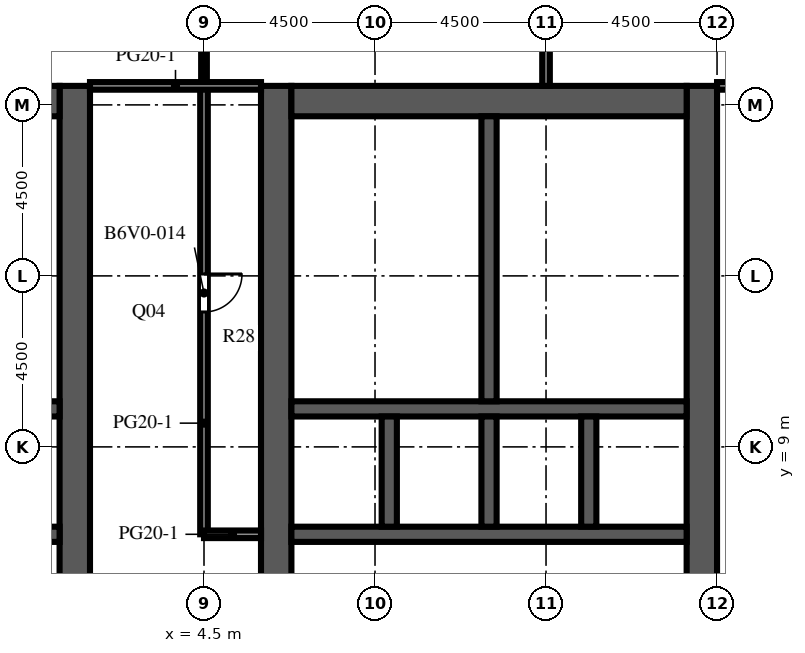
"""IFC4 building model, lengths in metres.
Left out: names, types, materials, properties, quantities, classifications, styles, units other than length and angle.
Written with IfcOpenShell. Run it as: python <this file> out.ifc"""

import sys

from ifc_helpers import new_model, si_unit, direction, frame, frame_2d, origin, place, context, subcontext, project, spatial, rectangle, extrude, element, fill, save


model = new_model("IFC4")
c1 = context("Model", 3, precision=1e-05, world=origin(), true_north=direction((0.0, 1.0)))
c2 = subcontext(c1, "Body", "Model", "MODEL_VIEW")
j1 = project(units=[si_unit("LENGTHUNIT", "METRE"), si_unit("PLANEANGLEUNIT", "RADIAN")], contexts=[c1])
p1 = place(None, origin())
s1 = spatial("IfcSite", under=j1, at=p1, CompositionType="ELEMENT")
p2 = place(p1, origin())
s2 = spatial("IfcBuilding", under=s1, at=p2, CompositionType="ELEMENT")
p3 = place(p2, frame((0.0, 0.0, 195.6)))
s3 = spatial("IfcBuildingStorey", under=s2, at=p3, CompositionType="ELEMENT", Elevation=195.6)
p4 = place(p3, frame((1.1, -9.0, 0.0), z_axis=(0.0, 0.0, 1.0), x_axis=(0.0, 1.0, 0.0)))
e1 = element("IfcWall", 1, at=p4, inside=s3, PredefinedType="SHEAR", context=c2, shape_type="SweptSolid", body=[
    extrude(rectangle(XDim=27.5, YDim=0.8, at=frame_2d((13.75, 0.0))), origin(), (0.0, 0.0, 1.0), 4.1),
])
p5 = place(p4, frame((12.55, 0.0, 0.0)))
e2 = element("IfcOpeningElement", 2, at=p5, cuts=e1, PredefinedType="OPENING", context=c2, shape_type="SweptSolid", body=[
    extrude(rectangle(XDim=2.4, YDim=2.4, at=frame_2d((1.2, 1.2))), frame((0.0, 0.41, 0.0), z_axis=(0.0, -1.0, 0.0), x_axis=(1.0, 0.0, 0.0)), (0.0, 0.0, 1.0), 0.82),
])
p6 = place(p4, frame((3.95, 0.0, 0.0)))
e3 = element("IfcOpeningElement", 3, at=p6, cuts=e1, PredefinedType="OPENING", context=c2, shape_type="SweptSolid", body=[
    extrude(rectangle(XDim=1.2, YDim=2.1, at=frame_2d((0.6, 1.05))), frame((0.0, 0.41, 0.0), z_axis=(0.0, -1.0, 0.0), x_axis=(1.0, 0.0, 0.0)), (0.0, 0.0, 1.0), 0.82),
])
p7 = place(p4, frame((19.45, 0.0, 0.0)))
e4 = element("IfcOpeningElement", 4, at=p7, cuts=e1, PredefinedType="OPENING", context=c2, shape_type="SweptSolid", body=[
    extrude(rectangle(XDim=1.0, YDim=2.1, at=frame_2d((0.5, 1.05))), frame((0.0, 0.41, 0.0), z_axis=(0.0, -1.0, 0.0), x_axis=(1.0, 0.0, 0.0)), (0.0, 0.0, 1.0), 0.82),
])
p8 = place(p4, frame((21.137, 0.0, 0.0)))
e5 = element("IfcOpeningElement", 5, at=p8, cuts=e1, PredefinedType="OPENING", context=c2, shape_type="SweptSolid", body=[
    extrude(rectangle(XDim=1.0, YDim=2.1, at=frame_2d((0.5, 1.05))), frame((0.0, 0.41, 0.0), z_axis=(0.0, -1.0, 0.0), x_axis=(1.0, 0.0, 0.0)), (0.0, 0.0, 1.0), 0.82),
])
p9 = place(p4, frame((23.2, 0.0, 0.0)))
e6 = element("IfcOpeningElement", 6, at=p9, cuts=e1, PredefinedType="OPENING", context=c2, shape_type="SweptSolid", body=[
    extrude(rectangle(XDim=1.0, YDim=2.1, at=frame_2d((0.5, 1.05))), frame((0.0, 0.41, 0.0), z_axis=(0.0, -1.0, 0.0), x_axis=(1.0, 0.0, 0.0)), (0.0, 0.0, 1.0), 0.82),
])
p10 = place(p4, frame((25.262, 0.0, 0.0)))
e7 = element("IfcOpeningElement", 7, at=p10, cuts=e1, PredefinedType="OPENING", context=c2, shape_type="SweptSolid", body=[
    extrude(rectangle(XDim=1.0, YDim=2.1, at=frame_2d((0.5, 1.05))), frame((0.0, 0.41, 0.0), z_axis=(0.0, -1.0, 0.0), x_axis=(1.0, 0.0, 0.0)), (0.0, 0.0, 1.0), 0.82),
])
p11 = place(p3, frame((-9.7, 18.1, 0.0), z_axis=(0.0, 0.0, 1.0), x_axis=(1.0, 0.0, 0.0)))
e8 = element("IfcWall", 8, at=p11, inside=s3, PredefinedType="SHEAR", context=c2, shape_type="SweptSolid", body=[
    extrude(rectangle(XDim=10.4, YDim=0.8, at=frame_2d((5.2, 0.0))), origin(), (0.0, 0.0, 1.0), 4.1),
])
p12 = place(p3, frame((-9.7, 6.7, 0.0), z_axis=(0.0, 0.0, 1.0), x_axis=(1.0, 0.0, 0.0)))
e9 = element("IfcWall", 9, at=p12, inside=s3, PredefinedType="SHEAR", context=c2, shape_type="SweptSolid", body=[
    extrude(rectangle(XDim=10.4, YDim=0.4, at=frame_2d((5.2, 0.0))), origin(), (0.0, 0.0, 1.0), 4.1),
])
p13 = place(p12, frame((3.337, 0.0, 0.0)))
e10 = element("IfcOpeningElement", 10, at=p13, cuts=e9, PredefinedType="OPENING", context=c2, shape_type="SweptSolid", body=[
    extrude(rectangle(XDim=1.1, YDim=2.1, at=frame_2d((0.55, 1.05))), frame((0.0, 0.21, 0.0), z_axis=(0.0, -1.0, 0.0), x_axis=(1.0, 0.0, 0.0)), (0.0, 0.0, 1.0), 0.42),
])
p14 = place(p12, frame((5.962, 0.0, 0.0)))
e11 = element("IfcOpeningElement", 11, at=p14, cuts=e9, PredefinedType="OPENING", context=c2, shape_type="SweptSolid", body=[
    extrude(rectangle(XDim=1.1, YDim=2.1, at=frame_2d((0.55, 1.05))), frame((0.0, 0.21, 0.0), z_axis=(0.0, -1.0, 0.0), x_axis=(1.0, 0.0, 0.0)), (0.0, 0.0, 1.0), 0.42),
])
p15 = place(p12, frame((8.663, 0.0, 0.0)))
e12 = element("IfcOpeningElement", 12, at=p15, cuts=e9, PredefinedType="OPENING", context=c2, shape_type="SweptSolid", body=[
    extrude(rectangle(XDim=1.1, YDim=2.1, at=frame_2d((0.55, 1.05))), frame((0.0, 0.21, 0.0), z_axis=(0.0, -1.0, 0.0), x_axis=(1.0, 0.0, 0.0)), (0.0, 0.0, 1.0), 0.42),
])
p16 = place(p12, frame((0.688, 0.0, 0.0)))
e13 = element("IfcOpeningElement", 13, at=p16, cuts=e9, PredefinedType="OPENING", context=c2, shape_type="SweptSolid", body=[
    extrude(rectangle(XDim=1.0, YDim=2.1, at=frame_2d((0.5, 1.05))), frame((0.0, 0.21, 0.0), z_axis=(0.0, -1.0, 0.0), x_axis=(1.0, 0.0, 0.0)), (0.0, 0.0, 1.0), 0.42),
])
p17 = place(p3, frame((-9.7, 10.0, 0.0), z_axis=(0.0, 0.0, 1.0), x_axis=(1.0, 0.0, 0.0)))
e14 = element("IfcWall", 14, at=p17, inside=s3, PredefinedType="SHEAR", context=c2, shape_type="SweptSolid", body=[
    extrude(rectangle(XDim=10.4, YDim=0.4, at=frame_2d((5.2, 0.0))), origin(), (0.0, 0.0, 1.0), 4.1),
])
p18 = place(p3, frame((6.4, -9.0, 0.0), z_axis=(0.0, 0.0, 1.0), x_axis=(0.0, 1.0, 0.0)))
e15 = element("IfcWall", 15, at=p18, inside=s3, PredefinedType="SHEAR", context=c2, shape_type="SweptSolid", body=[
    extrude(rectangle(XDim=27.5, YDim=0.8, at=frame_2d((13.75, 0.0))), origin(), (0.0, 0.0, 1.0), 4.1),
])
p19 = place(p18, frame((12.55, 0.0, 0.0)))
e16 = element("IfcOpeningElement", 16, at=p19, cuts=e15, PredefinedType="OPENING", context=c2, shape_type="SweptSolid", body=[
    extrude(rectangle(XDim=2.4, YDim=2.4, at=frame_2d((1.2, 1.2))), frame((0.0, 0.41, 0.0), z_axis=(0.0, -1.0, 0.0), x_axis=(1.0, 0.0, 0.0)), (0.0, 0.0, 1.0), 0.82),
])
p20 = place(p18, frame((3.95, 0.0, 0.0)))
e17 = element("IfcOpeningElement", 17, at=p20, cuts=e15, PredefinedType="OPENING", context=c2, shape_type="SweptSolid", body=[
    extrude(rectangle(XDim=1.2, YDim=2.1, at=frame_2d((0.6, 1.05))), frame((0.0, 0.41, 0.0), z_axis=(0.0, -1.0, 0.0), x_axis=(1.0, 0.0, 0.0)), (0.0, 0.0, 1.0), 0.82),
])
p21 = place(p18, frame((19.45, 0.0, 0.0)))
e18 = element("IfcOpeningElement", 18, at=p21, cuts=e15, PredefinedType="OPENING", context=c2, shape_type="SweptSolid", body=[
    extrude(rectangle(XDim=1.0, YDim=2.1, at=frame_2d((0.5, 1.05))), frame((0.0, 0.41, 0.0), z_axis=(0.0, -1.0, 0.0), x_axis=(1.0, 0.0, 0.0)), (0.0, 0.0, 1.0), 0.82),
])
p22 = place(p18, frame((21.137, 0.0, 0.0)))
e19 = element("IfcOpeningElement", 19, at=p22, cuts=e15, PredefinedType="OPENING", context=c2, shape_type="SweptSolid", body=[
    extrude(rectangle(XDim=1.0, YDim=2.1, at=frame_2d((0.5, 1.05))), frame((0.0, 0.41, 0.0), z_axis=(0.0, -1.0, 0.0), x_axis=(1.0, 0.0, 0.0)), (0.0, 0.0, 1.0), 0.82),
])
p23 = place(p18, frame((23.2, 0.0, 0.0)))
e20 = element("IfcOpeningElement", 20, at=p23, cuts=e15, PredefinedType="OPENING", context=c2, shape_type="SweptSolid", body=[
    extrude(rectangle(XDim=1.0, YDim=2.1, at=frame_2d((0.5, 1.05))), frame((0.0, 0.41, 0.0), z_axis=(0.0, -1.0, 0.0), x_axis=(1.0, 0.0, 0.0)), (0.0, 0.0, 1.0), 0.82),
])
p24 = place(p18, frame((25.262, 0.0, 0.0)))
e21 = element("IfcOpeningElement", 21, at=p24, cuts=e15, PredefinedType="OPENING", context=c2, shape_type="SweptSolid", body=[
    extrude(rectangle(XDim=1.0, YDim=2.1, at=frame_2d((0.5, 1.05))), frame((0.0, 0.41, 0.0), z_axis=(0.0, -1.0, 0.0), x_axis=(1.0, 0.0, 0.0)), (0.0, 0.0, 1.0), 0.82),
])
p25 = place(p3, frame((17.6, -9.0, 0.0), z_axis=(0.0, 0.0, 1.0), x_axis=(0.0, 1.0, 0.0)))
e22 = element("IfcWall", 22, at=p25, inside=s3, PredefinedType="SHEAR", context=c2, shape_type="SweptSolid", body=[
    extrude(rectangle(XDim=27.5, YDim=0.8, at=frame_2d((13.75, 0.0))), origin(), (0.0, 0.0, 1.0), 4.1),
])
p26 = place(p25, frame((12.55, 0.0, 0.0)))
e23 = element("IfcOpeningElement", 23, at=p26, cuts=e22, PredefinedType="OPENING", context=c2, shape_type="SweptSolid", body=[
    extrude(rectangle(XDim=2.4, YDim=2.4, at=frame_2d((1.2, 1.2))), frame((0.0, 0.41, 0.0), z_axis=(0.0, -1.0, 0.0), x_axis=(1.0, 0.0, 0.0)), (0.0, 0.0, 1.0), 0.82),
])
p27 = place(p25, frame((6.825, 0.0, 0.0)))
e24 = element("IfcOpeningElement", 24, at=p27, cuts=e22, PredefinedType="OPENING", context=c2, shape_type="SweptSolid", body=[
    extrude(rectangle(XDim=1.2, YDim=2.1, at=frame_2d((0.6, 1.05))), frame((0.0, 0.41, 0.0), z_axis=(0.0, -1.0, 0.0), x_axis=(1.0, 0.0, 0.0)), (0.0, 0.0, 1.0), 0.82),
])
p28 = place(p25, frame((19.475, 0.0, 0.0)))
e25 = element("IfcOpeningElement", 25, at=p28, cuts=e22, PredefinedType="OPENING", context=c2, shape_type="SweptSolid", body=[
    extrude(rectangle(XDim=1.2, YDim=2.1, at=frame_2d((0.6, 1.05))), frame((0.0, 0.41, 0.0), z_axis=(0.0, -1.0, 0.0), x_axis=(1.0, 0.0, 0.0)), (0.0, 0.0, 1.0), 0.82),
])
p29 = place(p3, frame((6.8, 18.1, 0.0), z_axis=(0.0, 0.0, 1.0), x_axis=(1.0, 0.0, 0.0)))
e26 = element("IfcWall", 26, at=p29, inside=s3, PredefinedType="SHEAR", context=c2, shape_type="SweptSolid", body=[
    extrude(rectangle(XDim=10.4, YDim=0.8, at=frame_2d((5.2, 0.0))), origin(), (0.0, 0.0, 1.0), 4.1),
])
p30 = place(p3, frame((6.8, 6.7, 0.0), z_axis=(0.0, 0.0, 1.0), x_axis=(1.0, 0.0, 0.0)))
e27 = element("IfcWall", 27, at=p30, inside=s3, PredefinedType="SHEAR", context=c2, shape_type="SweptSolid", body=[
    extrude(rectangle(XDim=10.4, YDim=0.4, at=frame_2d((5.2, 0.0))), origin(), (0.0, 0.0, 1.0), 4.1),
])
p31 = place(p30, frame((3.337, 0.0, 0.0)))
e28 = element("IfcOpeningElement", 28, at=p31, cuts=e27, PredefinedType="OPENING", context=c2, shape_type="SweptSolid", body=[
    extrude(rectangle(XDim=1.1, YDim=2.1, at=frame_2d((0.55, 1.05))), frame((0.0, 0.21, 0.0), z_axis=(0.0, -1.0, 0.0), x_axis=(1.0, 0.0, 0.0)), (0.0, 0.0, 1.0), 0.42),
])
p32 = place(p30, frame((5.962, 0.0, 0.0)))
e29 = element("IfcOpeningElement", 29, at=p32, cuts=e27, PredefinedType="OPENING", context=c2, shape_type="SweptSolid", body=[
    extrude(rectangle(XDim=1.1, YDim=2.1, at=frame_2d((0.55, 1.05))), frame((0.0, 0.21, 0.0), z_axis=(0.0, -1.0, 0.0), x_axis=(1.0, 0.0, 0.0)), (0.0, 0.0, 1.0), 0.42),
])
p33 = place(p30, frame((8.663, 0.0, 0.0)))
e30 = element("IfcOpeningElement", 30, at=p33, cuts=e27, PredefinedType="OPENING", context=c2, shape_type="SweptSolid", body=[
    extrude(rectangle(XDim=1.1, YDim=2.1, at=frame_2d((0.55, 1.05))), frame((0.0, 0.21, 0.0), z_axis=(0.0, -1.0, 0.0), x_axis=(1.0, 0.0, 0.0)), (0.0, 0.0, 1.0), 0.42),
])
p34 = place(p30, frame((0.688, 0.0, 0.0)))
e31 = element("IfcOpeningElement", 31, at=p34, cuts=e27, PredefinedType="OPENING", context=c2, shape_type="SweptSolid", body=[
    extrude(rectangle(XDim=1.0, YDim=2.1, at=frame_2d((0.5, 1.05))), frame((0.0, 0.21, 0.0), z_axis=(0.0, -1.0, 0.0), x_axis=(1.0, 0.0, 0.0)), (0.0, 0.0, 1.0), 0.42),
])
p35 = place(p3, frame((6.8, 10.0, 0.0), z_axis=(0.0, 0.0, 1.0), x_axis=(1.0, 0.0, 0.0)))
e32 = element("IfcWall", 32, at=p35, inside=s3, PredefinedType="SHEAR", context=c2, shape_type="SweptSolid", body=[
    extrude(rectangle(XDim=10.4, YDim=0.4, at=frame_2d((5.2, 0.0))), origin(), (0.0, 0.0, 1.0), 4.1),
])
for number, where, z_axis, x_axis in (
    (33, (9.375, 6.9, 0.0), (0.0, 0.0, 1.0), (0.0, 1.0, 0.0)),
    (34, (12.0, 6.9, 0.0), (0.0, 0.0, 1.0), (0.0, 1.0, 0.0)),
    (35, (14.625, 6.9, 0.0), (0.0, 0.0, 1.0), (0.0, 1.0, 0.0)),
):
    element("IfcWall", number, at=place(p3, frame(where, z_axis=z_axis, x_axis=x_axis)), inside=s3, PredefinedType="SHEAR", context=c2, shape_type="SweptSolid", body=[
        extrude(rectangle(XDim=2.9, YDim=0.4, at=frame_2d((1.45, 0.0))), origin(), (0.0, 0.0, 1.0), 4.1),
    ])
p36 = place(p3, frame((12.0, 10.2, 0.0), z_axis=(0.0, 0.0, 1.0), x_axis=(0.0, 1.0, 0.0)))
e36 = element("IfcWall", 36, at=p36, inside=s3, PredefinedType="SHEAR", context=c2, shape_type="SweptSolid", body=[
    extrude(rectangle(XDim=7.5, YDim=0.4, at=frame_2d((3.75, 0.0))), origin(), (0.0, 0.0, 1.0), 4.1),
])
for number, where, z_axis, x_axis in (
    (37, (-4.3, 11.7, 0.0), (0.0, 0.0, 1.0), (1.0, 0.0, 0.0)),
    (38, (-4.3, 13.575, 0.0), (0.0, 0.0, 1.0), (1.0, 0.0, 0.0)),
    (39, (-4.3, 15.825, 0.0), (0.0, 0.0, 1.0), (1.0, 0.0, 0.0)),
    (40, (6.8, 11.7, 0.0), (0.0, 0.0, 1.0), (1.0, 0.0, 0.0)),
    (41, (6.8, 13.575, 0.0), (0.0, 0.0, 1.0), (1.0, 0.0, 0.0)),
    (42, (6.8, 15.825, 0.0), (0.0, 0.0, 1.0), (1.0, 0.0, 0.0)),
):
    element("IfcWall", number, at=place(p3, frame(where, z_axis=z_axis, x_axis=x_axis)), inside=s3, PredefinedType="PARTITIONING", context=c2, shape_type="SweptSolid", body=[
        extrude(rectangle(XDim=5.0, YDim=0.1, at=frame_2d((2.5, 0.0))), origin(), (0.0, 0.0, 1.0), 3.65),
    ])
p37 = place(p3, frame((4.5, 26.5, 0.0), z_axis=(0.0, 0.0, 1.0), x_axis=(0.0, -1.0, 0.0)))
e43 = element("IfcWall", 43, at=p37, inside=s3, PredefinedType="PARTITIONING", context=c2, shape_type="SweptSolid", body=[
    extrude(rectangle(XDim=8.0, YDim=0.15, at=frame_2d((4.0, 0.0))), origin(), (0.0, 0.0, 1.0), 3.65),
])
p38 = place(p37, frame((3.15, 0.0, 0.0)))
e44 = element("IfcOpeningElement", 44, at=p38, cuts=e43, PredefinedType="OPENING", context=c2, shape_type="SweptSolid", body=[
    extrude(rectangle(XDim=1.0, YDim=2.1, at=frame_2d((0.5, 1.05))), frame((0.0, 0.085, 0.0), z_axis=(0.0, -1.0, 0.0), x_axis=(1.0, 0.0, 0.0)), (0.0, 0.0, 1.0), 0.17),
])
p39 = place(p3, frame((4.5, 18.5, 0.0), z_axis=(0.0, 0.0, 1.0), x_axis=(0.0, -1.0, 0.0)))
e45 = element("IfcWall", 45, at=p39, inside=s3, PredefinedType="PARTITIONING", context=c2, shape_type="SweptSolid", body=[
    extrude(rectangle(XDim=11.8, YDim=0.2, at=frame_2d((5.9, 0.0))), origin(), (0.0, 0.0, 1.0), 3.65),
])
p40 = place(p39, frame((4.95, 0.0, 0.0)))
e46 = element("IfcOpeningElement", 46, at=p40, cuts=e45, PredefinedType="OPENING", context=c2, shape_type="SweptSolid", body=[
    extrude(rectangle(XDim=1.0, YDim=2.1, at=frame_2d((0.5, 1.05))), frame((0.0, 0.11, 0.0), z_axis=(0.0, -1.0, 0.0), x_axis=(1.0, 0.0, 0.0)), (0.0, 0.0, 1.0), 0.22),
])
p41 = place(p3, frame((13.5, 18.5, 0.0), z_axis=(0.0, 0.0, 1.0), x_axis=(0.0, 1.0, 0.0)))
e47 = element("IfcWall", 47, at=p41, inside=s3, PredefinedType="PARTITIONING", context=c2, shape_type="SweptSolid", body=[
    extrude(rectangle(XDim=8.0, YDim=0.2, at=frame_2d((4.0, 0.0))), origin(), (0.0, 0.0, 1.0), 3.65),
])
p42 = place(p3, frame((4.5, 6.7, 0.0), z_axis=(0.0, 0.0, 1.0), x_axis=(1.0, 0.0, 0.0)))
e48 = element("IfcWall", 48, at=p42, inside=s3, PredefinedType="PARTITIONING", context=c2, shape_type="SweptSolid", body=[
    extrude(rectangle(XDim=1.5, YDim=0.2, at=frame_2d((0.75, 0.0))), origin(), (0.0, 0.0, 1.0), 3.65),
])
p43 = place(p3, frame((1.5, 18.5, 0.0), z_axis=(0.0, 0.0, 1.0), x_axis=(1.0, 0.0, 0.0)))
e49 = element("IfcWall", 49, at=p43, inside=s3, PredefinedType="PARTITIONING", context=c2, shape_type="SweptSolid", body=[
    extrude(rectangle(XDim=4.5, YDim=0.2, at=frame_2d((2.25, 0.0))), origin(), (0.0, 0.0, 1.0), 3.65),
])
p44 = place(p3, frame((18.0, 18.5, 0.0), z_axis=(0.0, 0.0, 1.0), x_axis=(1.0, 0.0, 0.0)))
e50 = element("IfcWall", 50, at=p44, inside=s3, PredefinedType="PARTITIONING", context=c2, shape_type="SweptSolid", body=[
    extrude(rectangle(XDim=3.0, YDim=0.2, at=frame_2d((1.5, 0.0))), origin(), (0.0, 0.0, 1.0), 3.65),
])
p45 = place(p44, frame((1.1, 0.0, 0.0)))
e51 = element("IfcOpeningElement", 51, at=p45, cuts=e50, PredefinedType="OPENING", context=c2, shape_type="SweptSolid", body=[
    extrude(rectangle(XDim=1.0, YDim=2.1, at=frame_2d((0.5, 1.05))), frame((0.0, 0.11, 0.0), z_axis=(0.0, -1.0, 0.0), x_axis=(1.0, 0.0, 0.0)), (0.0, 0.0, 1.0), 0.22),
])
p46 = place(p31, origin())
e52 = element("IfcDoor", 52, at=p46, inside=s3, OperationType="DOUBLE_DOOR_SLIDING", PredefinedType="DOOR", context=c2, shape_type="SweptSolid", body=[
    extrude(rectangle(XDim=1.1, YDim=2.1, at=frame_2d((0.55, 1.05))), frame((0.0, 0.025, 0.0), z_axis=(0.0, -1.0, 0.0), x_axis=(1.0, 0.0, 0.0)), (0.0, 0.0, 1.0), 0.05),
])
fill(e28, e52)
p47 = place(p32, origin())
e53 = element("IfcDoor", 53, at=p47, inside=s3, OperationType="DOUBLE_DOOR_SLIDING", PredefinedType="DOOR", context=c2, shape_type="SweptSolid", body=[
    extrude(rectangle(XDim=1.1, YDim=2.1, at=frame_2d((0.55, 1.05))), frame((0.0, 0.025, 0.0), z_axis=(0.0, -1.0, 0.0), x_axis=(1.0, 0.0, 0.0)), (0.0, 0.0, 1.0), 0.05),
])
fill(e29, e53)
p48 = place(p33, origin())
e54 = element("IfcDoor", 54, at=p48, inside=s3, OperationType="DOUBLE_DOOR_SLIDING", PredefinedType="DOOR", context=c2, shape_type="SweptSolid", body=[
    extrude(rectangle(XDim=1.1, YDim=2.1, at=frame_2d((0.55, 1.05))), frame((0.0, 0.025, 0.0), z_axis=(0.0, -1.0, 0.0), x_axis=(1.0, 0.0, 0.0)), (0.0, 0.0, 1.0), 0.05),
])
fill(e30, e54)
p49 = place(p5, origin())
e55 = element("IfcDoor", 55, at=p49, inside=s3, OperationType="DOUBLE_DOOR_DOUBLE_SWING", PredefinedType="DOOR", context=c2, shape_type="SweptSolid", body=[
    extrude(rectangle(XDim=2.4, YDim=2.4, at=frame_2d((1.2, 1.2))), frame((0.0, 0.025, 0.0), z_axis=(0.0, -1.0, 0.0), x_axis=(1.0, 0.0, 0.0)), (0.0, 0.0, 1.0), 0.05),
])
fill(e2, e55)
p50 = place(p19, origin())
e56 = element("IfcDoor", 56, at=p50, inside=s3, OperationType="DOUBLE_DOOR_DOUBLE_SWING", PredefinedType="DOOR", context=c2, shape_type="SweptSolid", body=[
    extrude(rectangle(XDim=2.4, YDim=2.4, at=frame_2d((1.2, 1.2))), frame((0.0, 0.025, 0.0), z_axis=(0.0, -1.0, 0.0), x_axis=(1.0, 0.0, 0.0)), (0.0, 0.0, 1.0), 0.05),
])
fill(e16, e56)
p51 = place(p26, origin())
e57 = element("IfcDoor", 57, at=p51, inside=s3, OperationType="DOUBLE_DOOR_DOUBLE_SWING", PredefinedType="DOOR", context=c2, shape_type="SweptSolid", body=[
    extrude(rectangle(XDim=2.4, YDim=2.4, at=frame_2d((1.2, 1.2))), frame((0.0, 0.025, 0.0), z_axis=(0.0, -1.0, 0.0), x_axis=(1.0, 0.0, 0.0)), (0.0, 0.0, 1.0), 0.05),
])
fill(e23, e57)
p52 = place(p28, frame((1.2, 0.0, 0.0), z_axis=(0.0, 0.0, 1.0), x_axis=(-1.0, 0.0, 0.0)))
e58 = element("IfcDoor", 58, at=p52, inside=s3, OperationType="SINGLE_SWING_LEFT", PredefinedType="DOOR", context=c2, shape_type="SweptSolid", body=[
    extrude(rectangle(XDim=1.2, YDim=2.1, at=frame_2d((0.6, 1.05))), frame((0.0, 0.025, 0.0), z_axis=(0.0, -1.0, 0.0), x_axis=(1.0, 0.0, 0.0)), (0.0, 0.0, 1.0), 0.05),
])
fill(e25, e58)
p53 = place(p7, origin())
e59 = element("IfcDoor", 59, at=p53, inside=s3, OperationType="SINGLE_SWING_LEFT", PredefinedType="DOOR", context=c2, shape_type="SweptSolid", body=[
    extrude(rectangle(XDim=1.0, YDim=2.1, at=frame_2d((0.5, 1.05))), frame((0.0, 0.375, 0.0), z_axis=(0.0, -1.0, 0.0), x_axis=(1.0, 0.0, 0.0)), (0.0, 0.0, 1.0), 0.05),
])
fill(e4, e59)
p54 = place(p8, origin())
e60 = element("IfcDoor", 60, at=p54, inside=s3, OperationType="SINGLE_SWING_RIGHT", PredefinedType="DOOR", context=c2, shape_type="SweptSolid", body=[
    extrude(rectangle(XDim=1.0, YDim=2.1, at=frame_2d((0.5, 1.05))), frame((0.0, 0.375, 0.0), z_axis=(0.0, -1.0, 0.0), x_axis=(1.0, 0.0, 0.0)), (0.0, 0.0, 1.0), 0.05),
])
fill(e5, e60)
p55 = place(p9, origin())
e61 = element("IfcDoor", 61, at=p55, inside=s3, OperationType="SINGLE_SWING_LEFT", PredefinedType="DOOR", context=c2, shape_type="SweptSolid", body=[
    extrude(rectangle(XDim=1.0, YDim=2.1, at=frame_2d((0.5, 1.05))), frame((0.0, 0.375, 0.0), z_axis=(0.0, -1.0, 0.0), x_axis=(1.0, 0.0, 0.0)), (0.0, 0.0, 1.0), 0.05),
])
fill(e6, e61)
p56 = place(p10, origin())
e62 = element("IfcDoor", 62, at=p56, inside=s3, OperationType="SINGLE_SWING_RIGHT", PredefinedType="DOOR", context=c2, shape_type="SweptSolid", body=[
    extrude(rectangle(XDim=1.0, YDim=2.1, at=frame_2d((0.5, 1.05))), frame((0.0, 0.375, 0.0), z_axis=(0.0, -1.0, 0.0), x_axis=(1.0, 0.0, 0.0)), (0.0, 0.0, 1.0), 0.05),
])
fill(e7, e62)
p57 = place(p34, origin())
e63 = element("IfcDoor", 63, at=p57, inside=s3, OperationType="SINGLE_SWING_LEFT", PredefinedType="DOOR", context=c2, shape_type="SweptSolid", body=[
    extrude(rectangle(XDim=1.0, YDim=2.1, at=frame_2d((0.5, 1.05))), frame((0.0, 0.025, 0.0), z_axis=(0.0, -1.0, 0.0), x_axis=(1.0, 0.0, 0.0)), (0.0, 0.0, 1.0), 0.05),
])
fill(e31, e63)
p58 = place(p21, origin())
e64 = element("IfcDoor", 64, at=p58, inside=s3, OperationType="SINGLE_SWING_RIGHT", PredefinedType="DOOR", context=c2, shape_type="SweptSolid", body=[
    extrude(rectangle(XDim=1.0, YDim=2.1, at=frame_2d((0.5, 1.05))), frame((0.0, -0.325, 0.0), z_axis=(0.0, -1.0, 0.0), x_axis=(1.0, 0.0, 0.0)), (0.0, 0.0, 1.0), 0.05),
])
fill(e18, e64)
p59 = place(p22, origin())
e65 = element("IfcDoor", 65, at=p59, inside=s3, OperationType="SINGLE_SWING_LEFT", PredefinedType="DOOR", context=c2, shape_type="SweptSolid", body=[
    extrude(rectangle(XDim=1.0, YDim=2.1, at=frame_2d((0.5, 1.05))), frame((0.0, -0.325, 0.0), z_axis=(0.0, -1.0, 0.0), x_axis=(1.0, 0.0, 0.0)), (0.0, 0.0, 1.0), 0.05),
])
fill(e19, e65)
p60 = place(p23, origin())
e66 = element("IfcDoor", 66, at=p60, inside=s3, OperationType="SINGLE_SWING_RIGHT", PredefinedType="DOOR", context=c2, shape_type="SweptSolid", body=[
    extrude(rectangle(XDim=1.0, YDim=2.1, at=frame_2d((0.5, 1.05))), frame((0.0, -0.325, 0.0), z_axis=(0.0, -1.0, 0.0), x_axis=(1.0, 0.0, 0.0)), (0.0, 0.0, 1.0), 0.05),
])
fill(e20, e66)
p61 = place(p24, origin())
e67 = element("IfcDoor", 67, at=p61, inside=s3, OperationType="SINGLE_SWING_LEFT", PredefinedType="DOOR", context=c2, shape_type="SweptSolid", body=[
    extrude(rectangle(XDim=1.0, YDim=2.1, at=frame_2d((0.5, 1.05))), frame((0.0, -0.325, 0.0), z_axis=(0.0, -1.0, 0.0), x_axis=(1.0, 0.0, 0.0)), (0.0, 0.0, 1.0), 0.05),
])
fill(e21, e67)
p62 = place(p40, origin())
e68 = element("IfcDoor", 68, at=p62, inside=s3, OperationType="SINGLE_SWING_LEFT", PredefinedType="DOOR", context=c2, shape_type="SweptSolid", body=[
    extrude(rectangle(XDim=1.0, YDim=2.1, at=frame_2d((0.5, 1.05))), frame((0.0, 0.025, 0.0), z_axis=(0.0, -1.0, 0.0), x_axis=(1.0, 0.0, 0.0)), (0.0, 0.0, 1.0), 0.05),
])
fill(e46, e68)
save(model, sys.argv[1])
